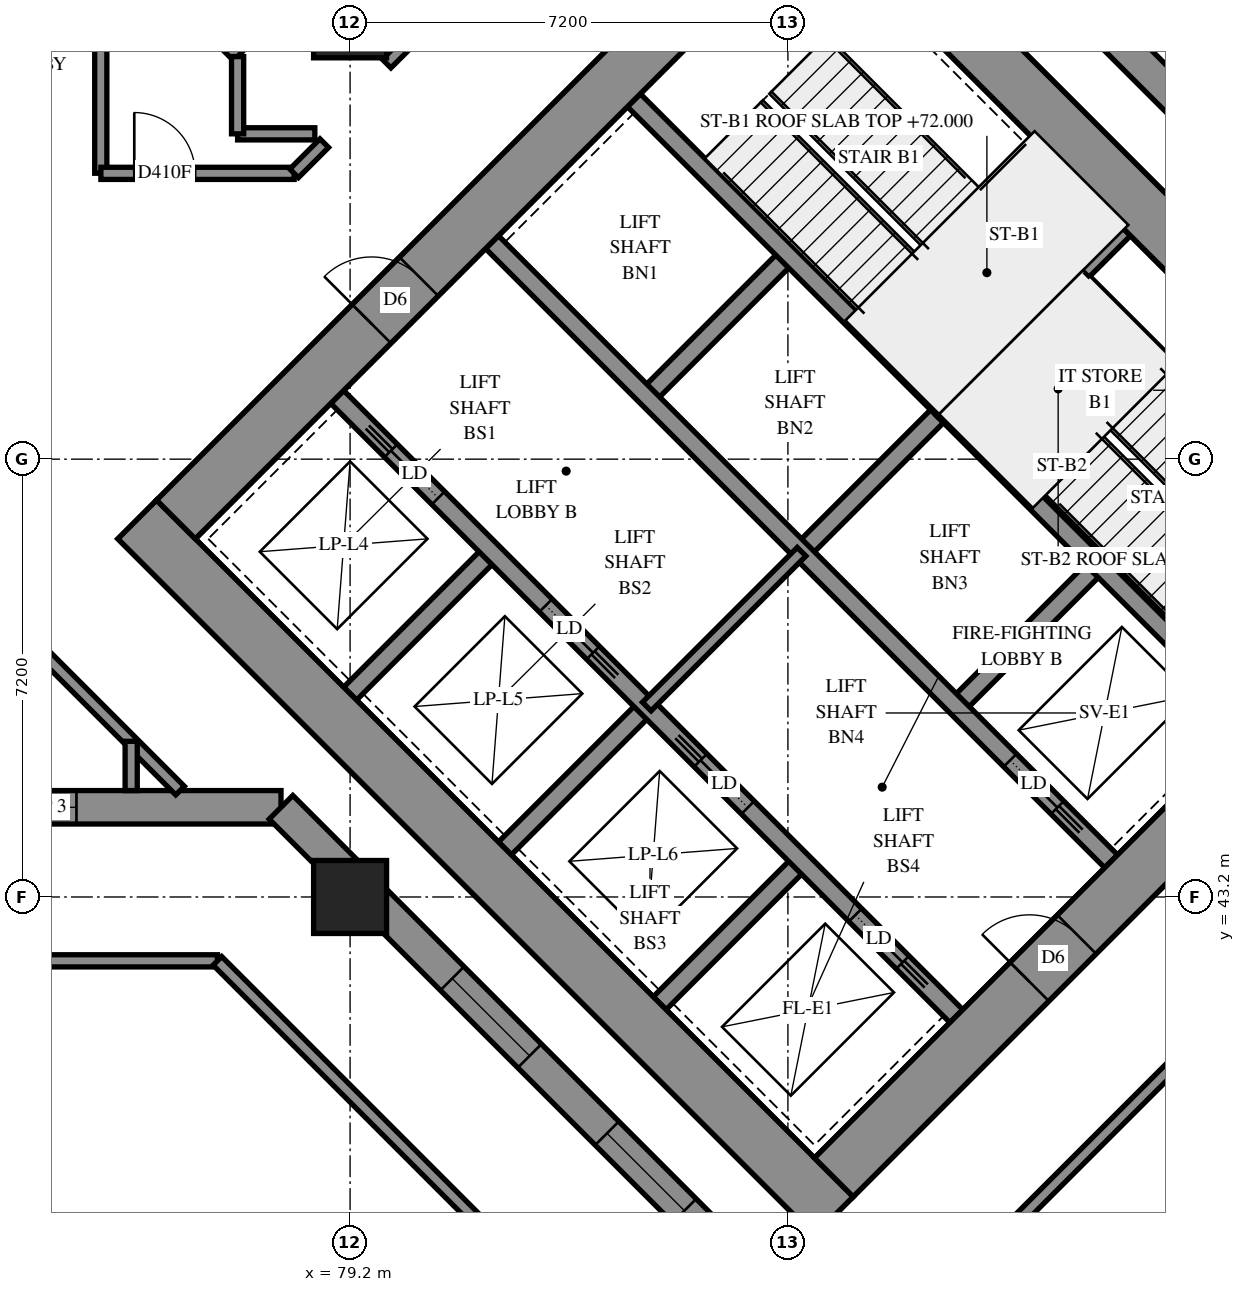
"""IFC4 building model, lengths in metres.
Left out: names, types, materials, properties, quantities, classifications, styles, units other than length and angle.
Written with IfcOpenShell. Run it as: python <this file> out.ifc"""

import sys

from ifc_helpers import new_model, si_unit, direction, frame, frame_2d, origin, origin_2d, place, context, subcontext, project, spatial, polyline, rectangle, outline, extrude, element, fill, save


model = new_model("IFC4")
c1 = context("Model", 3, precision=1e-05, world=origin(), true_north=direction((0.0, 1.0)))
c2 = subcontext(c1, "Body", "Model", "MODEL_VIEW")
j1 = project(units=[si_unit("LENGTHUNIT", "METRE"), si_unit("PLANEANGLEUNIT", "RADIAN")], contexts=[c1])
p1 = place(None, origin())
s1 = spatial("IfcSite", under=j1, at=p1, CompositionType="ELEMENT")
p2 = place(p1, origin())
s2 = spatial("IfcBuilding", under=s1, at=p2, CompositionType="ELEMENT")
p3 = place(p2, frame((0.0, 0.0, 72.0)))
s3 = spatial("IfcBuildingStorey", under=s2, at=p3, CompositionType="ELEMENT", Elevation=72.0)
for number, where, z_axis, x_axis in (
    (1, (79.2, 43.2, 0.0), (0.0, 0.0, 1.0), (1.0, 0.0, 0.0)),
    (2, (79.2, 57.6, 0.0), (0.0, 0.0, 1.0), (1.0, 0.0, 0.0)),
):
    element("IfcColumn", number, at=place(p3, frame(where, z_axis=z_axis, x_axis=x_axis)), inside=s3, PredefinedType="COLUMN", context=c2, shape_type="SweptSolid", body=[
        extrude(rectangle(XDim=1.2, YDim=1.2, at=origin_2d()), origin(), (0.0, 0.0, 1.0), 4.7),
    ])
p4 = place(p3, frame((75.7, 49.408, -0.3), z_axis=(0.0, 0.0, 1.0), x_axis=(0.7071098676, -0.7071036948, 0.0)))
e3 = element("IfcWall", 3, at=p4, inside=s3, PredefinedType="SHEAR", context=c2, shape_type="SweptSolid", body=[
    extrude(rectangle(XDim=16.2, YDim=0.9, at=frame_2d((8.1, 0.0))), origin(), (0.0, 0.0, 1.0), 4.3),
])
p5 = place(p3, frame((86.519, 60.227, -0.3), z_axis=(0.0, 0.0, 1.0), x_axis=(0.7071036948, -0.7071098676, 0.0)))
e4 = element("IfcWall", 4, at=p5, inside=s3, PredefinedType="SHEAR", context=c2, shape_type="SweptSolid", body=[
    extrude(rectangle(XDim=16.2, YDim=0.9, at=frame_2d((8.1, 0.0))), origin(), (0.0, 0.0, 1.0), 4.3),
])
p6 = place(p5, frame((10.9, 0.0, 0.3)))
e5 = element("IfcOpeningElement", 5, at=p6, cuts=e4, PredefinedType="OPENING", context=c2, shape_type="SweptSolid", body=[
    extrude(rectangle(XDim=0.8, YDim=2.1, at=frame_2d((0.4, 1.05))), frame((0.0, 0.46, 0.0), z_axis=(0.0, -1.0, 0.0), x_axis=(1.0, 0.0, 0.0)), (0.0, 0.0, 1.0), 0.92),
])
p7 = place(p3, frame((76.336, 49.408, -0.3), z_axis=(0.0, 0.0, 1.0), x_axis=(0.7071067812, 0.7071067812, 0.0)))
e6 = element("IfcWall", 6, at=p7, inside=s3, PredefinedType="SHEAR", context=c2, shape_type="SweptSolid", body=[
    extrude(rectangle(XDim=14.4, YDim=0.9, at=frame_2d((7.2, 0.0))), origin(), (0.0, 0.0, 1.0), 4.3),
])
p8 = place(p7, frame((4.55, 0.0, 0.3)))
e7 = element("IfcOpeningElement", 7, at=p8, cuts=e6, PredefinedType="OPENING", context=c2, shape_type="SweptSolid", body=[
    extrude(rectangle(XDim=1.1, YDim=2.1, at=frame_2d((0.55, 1.05))), frame((0.0, 0.46, 0.0), z_axis=(0.0, -1.0, 0.0), x_axis=(1.0, 0.0, 0.0)), (0.0, 0.0, 1.0), 0.92),
])
p9 = place(p7, frame((11.35, 0.0, 0.3)))
e8 = element("IfcOpeningElement", 8, at=p9, cuts=e6, PredefinedType="OPENING", context=c2, shape_type="SweptSolid", body=[
    extrude(rectangle(XDim=1.1, YDim=2.1, at=frame_2d((0.55, 1.05))), frame((0.0, 0.46, 0.0), z_axis=(0.0, -1.0, 0.0), x_axis=(1.0, 0.0, 0.0)), (0.0, 0.0, 1.0), 0.92),
])
p10 = place(p3, frame((87.155, 38.589, -0.3), z_axis=(0.0, 0.0, 1.0), x_axis=(0.7071067812, 0.7071067812, 0.0)))
e9 = element("IfcWall", 9, at=p10, inside=s3, PredefinedType="SHEAR", context=c2, shape_type="SweptSolid", body=[
    extrude(rectangle(XDim=14.4, YDim=0.9, at=frame_2d((7.2, 0.0))), origin(), (0.0, 0.0, 1.0), 4.3),
])
p11 = place(p10, frame((4.55, 0.0, 0.3)))
e10 = element("IfcOpeningElement", 10, at=p11, cuts=e9, PredefinedType="OPENING", context=c2, shape_type="SweptSolid", body=[
    extrude(rectangle(XDim=1.1, YDim=2.1, at=frame_2d((0.55, 1.05))), frame((0.0, 0.46, 0.0), z_axis=(0.0, -1.0, 0.0), x_axis=(1.0, 0.0, 0.0)), (0.0, 0.0, 1.0), 0.92),
])
p12 = place(p10, frame((11.35, 0.0, 0.3)))
e11 = element("IfcOpeningElement", 11, at=p12, cuts=e9, PredefinedType="OPENING", context=c2, shape_type="SweptSolid", body=[
    extrude(rectangle(XDim=1.1, YDim=2.1, at=frame_2d((0.55, 1.05))), frame((0.0, 0.46, 0.0), z_axis=(0.0, -1.0, 0.0), x_axis=(1.0, 0.0, 0.0)), (0.0, 0.0, 1.0), 0.92),
])
for number, where, z_axis, x_axis in (
    (12, (79.2, 46.544, 0.0), (0.0, 0.0, 1.0), (0.707, 0.707, 0.0)),
    (13, (84.079, 51.423, 0.0), (0.0, 0.0, 1.0), (0.707, 0.707, 0.0)),
):
    element("IfcWall", number, at=place(p3, frame(where, z_axis=z_axis, x_axis=x_axis)), inside=s3, PredefinedType="SOLIDWALL", context=c2, shape_type="SweptSolid", body=[
        extrude(rectangle(XDim=3.3, YDim=0.3, at=frame_2d((1.65, 0.0))), origin(), (0.0, 0.0, 1.0), 4.7),
    ])
p13 = place(p3, frame((81.746, 43.999, 0.0), z_axis=(0.0, 0.0, 1.0), x_axis=(0.7071067812, 0.7071067812, 0.0)))
e14 = element("IfcWall", 14, at=p13, inside=s3, PredefinedType="SOLIDWALL", context=c2, shape_type="SweptSolid", body=[
    extrude(rectangle(XDim=3.3, YDim=0.3, at=frame_2d((1.65, 0.0))), origin(), (0.0, 0.0, 1.0), 4.7),
])
p14 = place(p3, frame((86.625, 48.878, 0.0), z_axis=(0.0, 0.0, 1.0), x_axis=(0.7071067812, 0.7071067812, 0.0)))
e15 = element("IfcWall", 15, at=p14, inside=s3, PredefinedType="SOLIDWALL", context=c2, shape_type="SweptSolid", body=[
    extrude(rectangle(XDim=3.3, YDim=0.3, at=frame_2d((1.65, 0.0))), origin(), (0.0, 0.0, 1.0), 4.7),
])
p15 = place(p3, frame((84.291, 41.453, 0.0), z_axis=(0.0, 0.0, 1.0), x_axis=(0.7071067812, 0.7071067812, 0.0)))
e16 = element("IfcWall", 16, at=p15, inside=s3, PredefinedType="SOLIDWALL", context=c2, shape_type="SweptSolid", body=[
    extrude(rectangle(XDim=3.3, YDim=0.3, at=frame_2d((1.65, 0.0))), origin(), (0.0, 0.0, 1.0), 4.7),
])
p16 = place(p3, frame((89.17, 46.332, 0.0), z_axis=(0.0, 0.0, 1.0), x_axis=(0.7071067812, 0.7071067812, 0.0)))
e17 = element("IfcWall", 17, at=p16, inside=s3, PredefinedType="SOLIDWALL", context=c2, shape_type="SweptSolid", body=[
    extrude(rectangle(XDim=3.3, YDim=0.3, at=frame_2d((1.65, 0.0))), origin(), (0.0, 0.0, 1.0), 4.7),
])
p17 = place(p3, frame((78.988, 51.423, 0.0), z_axis=(0.0, 0.0, 1.0), x_axis=(0.7071067812, -0.7071067812, 0.0)))
e18 = element("IfcWall", 18, at=p17, inside=s3, PredefinedType="SOLIDWALL", context=c2, shape_type="SweptSolid", body=[
    extrude(rectangle(XDim=14.4, YDim=0.3, at=frame_2d((7.2, 0.0))), origin(), (0.0, 0.0, 1.0), 4.7),
])
p18 = place(p17, frame((1.25, 0.0, 0.0)))
e19 = element("IfcOpeningElement", 19, at=p18, cuts=e18, PredefinedType="OPENING", context=c2, shape_type="SweptSolid", body=[
    extrude(rectangle(XDim=1.1, YDim=2.1, at=frame_2d((0.55, 1.05))), frame((0.0, 0.16, 0.0), z_axis=(0.0, -1.0, 0.0), x_axis=(1.0, 0.0, 0.0)), (0.0, 0.0, 1.0), 0.32),
])
p19 = place(p17, frame((4.85, 0.0, 0.0)))
e20 = element("IfcOpeningElement", 20, at=p19, cuts=e18, PredefinedType="OPENING", context=c2, shape_type="SweptSolid", body=[
    extrude(rectangle(XDim=1.1, YDim=2.1, at=frame_2d((0.55, 1.05))), frame((0.0, 0.16, 0.0), z_axis=(0.0, -1.0, 0.0), x_axis=(1.0, 0.0, 0.0)), (0.0, 0.0, 1.0), 0.32),
])
p20 = place(p17, frame((8.45, 0.0, 0.0)))
e21 = element("IfcOpeningElement", 21, at=p20, cuts=e18, PredefinedType="OPENING", context=c2, shape_type="SweptSolid", body=[
    extrude(rectangle(XDim=1.1, YDim=2.1, at=frame_2d((0.55, 1.05))), frame((0.0, 0.16, 0.0), z_axis=(0.0, -1.0, 0.0), x_axis=(1.0, 0.0, 0.0)), (0.0, 0.0, 1.0), 0.32),
])
p21 = place(p17, frame((12.05, 0.0, 0.0)))
e22 = element("IfcOpeningElement", 22, at=p21, cuts=e18, PredefinedType="OPENING", context=c2, shape_type="SweptSolid", body=[
    extrude(rectangle(XDim=1.1, YDim=2.1, at=frame_2d((0.55, 1.05))), frame((0.0, 0.16, 0.0), z_axis=(0.0, -1.0, 0.0), x_axis=(1.0, 0.0, 0.0)), (0.0, 0.0, 1.0), 0.32),
])
p22 = place(p3, frame((81.534, 53.969, 0.0), z_axis=(0.0, 0.0, 1.0), x_axis=(0.707103309, -0.7071102534, 0.0)))
e23 = element("IfcWall", 23, at=p22, inside=s3, PredefinedType="SOLIDWALL", context=c2, shape_type="SweptSolid", body=[
    extrude(rectangle(XDim=14.4, YDim=0.3, at=frame_2d((7.2, 0.0))), origin(), (0.0, 0.0, 1.0), 4.7),
])
p23 = place(p22, frame((12.05, 0.0, 0.0)))
e24 = element("IfcOpeningElement", 24, at=p23, cuts=e23, PredefinedType="OPENING", context=c2, shape_type="SweptSolid", body=[
    extrude(rectangle(XDim=1.1, YDim=2.1, at=frame_2d((0.55, 1.05))), frame((0.0, 0.16, 0.0), z_axis=(0.0, -1.0, 0.0), x_axis=(1.0, 0.0, 0.0)), (0.0, 0.0, 1.0), 0.32),
])
for number, where, z_axis, x_axis in (
    (25, (83.867, 56.302, 0.0), (0.0, 0.0, 1.0), (0.707, -0.707, 0.0)),
    (26, (88.958, 51.211, 0.0), (0.0, 0.0, 1.0), (0.707, -0.707, 0.0)),
):
    element("IfcWall", number, at=place(p3, frame(where, z_axis=z_axis, x_axis=x_axis)), inside=s3, PredefinedType="SOLIDWALL", context=c2, shape_type="SweptSolid", body=[
        extrude(rectangle(XDim=7.2, YDim=0.3, at=frame_2d((3.6, 0.0))), origin(), (0.0, 0.0, 1.0), 4.7),
    ])
p24 = place(p3, frame((88.958, 51.211, 0.0), z_axis=(0.0, 0.0, 1.0), x_axis=(0.7071067812, 0.7071067812, 0.0)))
e27 = element("IfcWall", 27, at=p24, inside=s3, PredefinedType="SOLIDWALL", context=c2, shape_type="SweptSolid", body=[
    extrude(rectangle(XDim=4.2, YDim=0.3, at=frame_2d((2.1, 0.0))), origin(), (0.0, 0.0, 1.0), 4.7),
])
p25 = place(p3, frame((111.055, 38.059, 0.0), z_axis=(0.0, 0.0, 1.0), x_axis=(-0.7071078702, 0.7071056922, 0.0)))
e28 = element("IfcWall", 28, at=p25, inside=s3, PredefinedType="SOLIDWALL", context=c2, shape_type="SweptSolid", body=[
    extrude(outline(polyline([(-0.275, -0.275), (46.028, -0.275), (45.8, 0.275), (0.275, 0.275), (-0.275, -0.275)])), origin(), (0.0, 0.0, 1.0), 4.7),
])
p26 = place(p3, frame((51.875, 44.675, 0.0), z_axis=(0.0, 0.0, 1.0), x_axis=(1.0, 0.0, 0.0)))
e29 = element("IfcWall", 29, at=p26, inside=s3, PredefinedType="SOLIDWALL", context=c2, shape_type="SweptSolid", body=[
    extrude(outline(polyline([(-0.275, -0.275), (26.075, -0.275), (26.303, 0.275), (0.275, 0.275), (-0.275, -0.275)])), origin(), (0.0, 0.0, 1.0), 4.7),
])
p27 = place(p26, frame((21.025, 0.0, 0.9)))
e30 = element("IfcOpeningElement", 30, at=p27, cuts=e29, PredefinedType="OPENING", context=c2, shape_type="SweptSolid", body=[
    extrude(rectangle(XDim=1.8, YDim=2.4, at=frame_2d((0.9, 1.2))), frame((0.0, 0.285, 0.0), z_axis=(0.0, -1.0, 0.0), x_axis=(1.0, 0.0, 0.0)), (0.0, 0.0, 1.0), 0.57),
])
p28 = place(p3, frame((78.064, 44.675, 0.0), z_axis=(0.0, 0.0, 1.0), x_axis=(0.7071084256, -0.7071051368, 0.0)))
e31 = element("IfcWall", 31, at=p28, inside=s3, PredefinedType="SOLIDWALL", context=c2, shape_type="SweptSolid", body=[
    extrude(outline(polyline([(0.114, -0.275), (30.682, -0.275), (30.132, 0.275), (-0.114, 0.275), (0.114, -0.275)])), origin(), (0.0, 0.0, 1.0), 4.7),
])
p29 = place(p28, frame((3.982, 0.0, 0.9)))
e32 = element("IfcOpeningElement", 32, at=p29, cuts=e31, PredefinedType="OPENING", context=c2, shape_type="SweptSolid", body=[
    extrude(rectangle(XDim=1.8, YDim=2.4, at=frame_2d((0.9, 1.2))), frame((0.0, 0.285, 0.0), z_axis=(0.0, -1.0, 0.0), x_axis=(1.0, 0.0, 0.0)), (0.0, 0.0, 1.0), 0.57),
])
p30 = place(p28, frame((7.582, 0.0, 0.9)))
e33 = element("IfcOpeningElement", 33, at=p30, cuts=e31, PredefinedType="OPENING", context=c2, shape_type="SweptSolid", body=[
    extrude(rectangle(XDim=1.8, YDim=2.4, at=frame_2d((0.9, 1.2))), frame((0.0, 0.285, 0.0), z_axis=(0.0, -1.0, 0.0), x_axis=(1.0, 0.0, 0.0)), (0.0, 0.0, 1.0), 0.57),
])
p31 = place(p3, frame((112.929, 39.756, 0.0), z_axis=(0.0, 0.0, 1.0), x_axis=(-0.7071067812, 0.7071067812, 0.0)))
e34 = element("IfcWall", 34, at=p31, inside=s3, PredefinedType="SOLIDWALL", context=c2, shape_type="SweptSolid", body=[
    extrude(outline(polyline([(-0.1, -0.1), (47.126, -0.1), (47.044, 0.1), (0.1, 0.1), (-0.1, -0.1)])), origin(), (0.0, 0.0, 1.0), 4.7),
])
p32 = place(p3, frame((49.35, 42.15, 0.0), z_axis=(0.0, 0.0, 1.0), x_axis=(1.0, 0.0, 0.0)))
e35 = element("IfcWall", 35, at=p32, inside=s3, PredefinedType="SOLIDWALL", context=c2, shape_type="SweptSolid", body=[
    extrude(outline(polyline([(-0.1, -0.1), (27.627, -0.1), (27.709, 0.1), (0.1, 0.1), (-0.1, -0.1)])), origin(), (0.0, 0.0, 1.0), 4.7),
])
p33 = place(p3, frame((77.018, 42.15, 0.0), z_axis=(0.0, 0.0, 1.0), x_axis=(0.7071067812, -0.7071067812, 0.0)))
e36 = element("IfcWall", 36, at=p33, inside=s3, PredefinedType="SOLIDWALL", context=c2, shape_type="SweptSolid", body=[
    extrude(outline(polyline([(0.041, -0.1), (31.986, -0.1), (31.786, 0.1), (-0.041, 0.1), (0.041, -0.1)])), origin(), (0.0, 0.0, 1.0), 4.7),
])
p34 = place(p3, frame((91.313, 53.354, 0.0), z_axis=(0.0, 0.0, 1.0), x_axis=(0.7071147811, -0.7070987812, 0.0)))
e37 = element("IfcWall", 37, at=p34, inside=s3, PredefinedType="PARTITIONING", context=c2, shape_type="SweptSolid", body=[
    extrude(rectangle(XDim=6.25, YDim=0.15, at=frame_2d((3.125, 0.0))), origin(), (0.0, 0.0, 1.0), 4.7),
])
p35 = place(p3, frame((84.079, 46.332, 0.0), z_axis=(0.0, 0.0, 1.0), x_axis=(0.7071067812, 0.7071067812, 0.0)))
e38 = element("IfcWall", 38, at=p35, inside=s3, PredefinedType="PARTITIONING", context=c2, shape_type="SweptSolid", body=[
    extrude(rectangle(XDim=3.6, YDim=0.2, at=frame_2d((1.8, 0.0))), origin(), (0.0, 0.0, 1.0), 4.7),
])
p36 = place(p3, frame((87.717, 35.411, 0.0), z_axis=(0.0, 0.0, 1.0), x_axis=(0.7072325651, 0.7069809749, 0.0)))
e39 = element("IfcWall", 39, at=p36, inside=s3, PredefinedType="PARTITIONING", context=c2, shape_type="SweptSolid", body=[
    extrude(rectangle(XDim=7.949, YDim=0.2, at=frame_2d((3.975, 0.0))), origin(), (0.0, 0.0, 1.0), 4.7),
])
p37 = place(p3, frame((75.1, 55.102, 0.0), z_axis=(0.0, 0.0, 1.0), x_axis=(0.0, 1.0, 0.0)))
e40 = element("IfcWall", 40, at=p37, inside=s3, PredefinedType="PARTITIONING", context=c2, shape_type="SweptSolid", body=[
    extrude(rectangle(XDim=4.166, YDim=0.2, at=frame_2d((2.083, 0.0))), origin(), (0.0, 0.0, 1.0), 4.7),
])
p38 = place(p3, frame((74.057, 47.297, 0.0), z_axis=(0.0, 0.0, 1.0), x_axis=(0.707121846, -0.707091716, 0.0)))
e41 = element("IfcWall", 41, at=p38, inside=s3, PredefinedType="PARTITIONING", context=c2, shape_type="SweptSolid", body=[
    extrude(rectangle(XDim=3.319, YDim=0.2, at=frame_2d((1.659, 0.0))), origin(), (0.0, 0.0, 1.0), 4.7),
])
p39 = place(p3, frame((75.102, 55.1, 0.0), z_axis=(0.0, 0.0, 1.0), x_axis=(1.0, 0.0, 0.0)))
e42 = element("IfcWall", 42, at=p39, inside=s3, PredefinedType="PARTITIONING", context=c2, shape_type="SweptSolid", body=[
    extrude(rectangle(XDim=3.178, YDim=0.2, at=frame_2d((1.589, 0.0))), origin(), (0.0, 0.0, 1.0), 4.7),
])
p40 = place(p39, frame((0.549, 0.0, 0.0)))
e43 = element("IfcOpeningElement", 43, at=p40, cuts=e42, PredefinedType="OPENING", context=c2, shape_type="SweptSolid", body=[
    extrude(rectangle(XDim=1.0, YDim=2.1, at=frame_2d((0.5, 1.05))), frame((0.0, 0.11, 0.0), z_axis=(0.0, -1.0, 0.0), x_axis=(1.0, 0.0, 0.0)), (0.0, 0.0, 1.0), 0.22),
])
p41 = place(p3, frame((75.879, 58.497, 0.0), z_axis=(0.0, 0.0, 1.0), x_axis=(0.7075866635, -0.706626573, 0.0)))
e44 = element("IfcWall", 44, at=p41, inside=s3, PredefinedType="PARTITIONING", context=c2, shape_type="SweptSolid", body=[
    extrude(rectangle(XDim=2.083, YDim=0.2, at=frame_2d((1.042, 0.0))), origin(), (0.0, 0.0, 1.0), 4.7),
])
p42 = place(p3, frame((79.801, 56.905, 0.0), z_axis=(0.0, 0.0, 1.0), x_axis=(0.7071067812, 0.7071067812, 0.0)))
e45 = element("IfcWall", 45, at=p42, inside=s3, PredefinedType="PARTITIONING", context=c2, shape_type="SweptSolid", body=[
    extrude(rectangle(XDim=1.765, YDim=0.2, at=frame_2d((0.882, 0.0))), origin(), (0.0, 0.0, 1.0), 4.7),
])
for number, where, z_axis, x_axis in (
    (46, (77.35, 55.75, 0.0), (0.0, 0.0, 1.0), (1.0, 0.0, 0.0)),
    (47, (77.35, 55.75, 0.0), (0.0, 0.0, 1.0), (0.0, 1.0, 0.0)),
):
    element("IfcWall", number, at=place(p3, frame(where, z_axis=z_axis, x_axis=x_axis)), inside=s3, PredefinedType="PARTITIONING", context=c2, shape_type="SweptSolid", body=[
        extrude(rectangle(XDim=1.27, YDim=0.2, at=frame_2d((0.635, 0.0))), origin(), (0.0, 0.0, 1.0), 4.7),
    ])
p43 = place(p3, frame((75.6, 44.95, 0.0), z_axis=(0.0, 0.0, 1.0), x_axis=(0.0, 1.0, 0.0)))
e48 = element("IfcWall", 48, at=p43, inside=s3, PredefinedType="PARTITIONING", context=c2, shape_type="SweptSolid", body=[
    extrude(rectangle(XDim=0.81, YDim=0.2, at=frame_2d((0.405, 0.0))), origin(), (0.0, 0.0, 1.0), 4.7),
])
p44 = place(p3, frame((78.279, 55.1, 0.0), z_axis=(0.0, 0.0, 1.0), x_axis=(0.7071067812, 0.7071067812, 0.0)))
e49 = element("IfcWall", 49, at=p44, inside=s3, PredefinedType="PARTITIONING", context=c2, shape_type="SweptSolid", body=[
    extrude(rectangle(XDim=0.701, YDim=0.2, at=frame_2d((0.351, 0.0))), origin(), (0.0, 0.0, 1.0), 4.7),
])
p45 = place(p27, origin())
e50 = element("IfcWindow", 50, at=p45, inside=s3, PartitioningType="SINGLE_PANEL", PredefinedType="WINDOW", context=c2, shape_type="SweptSolid", body=[
    extrude(rectangle(XDim=1.8, YDim=2.4, at=frame_2d((0.9, 1.2))), frame((0.0, 0.155, 0.0), z_axis=(0.0, -1.0, 0.0), x_axis=(1.0, 0.0, 0.0)), (0.0, 0.0, 1.0), 0.06),
])
fill(e30, e50)
p46 = place(p29, origin())
e51 = element("IfcWindow", 51, at=p46, inside=s3, PartitioningType="SINGLE_PANEL", PredefinedType="WINDOW", context=c2, shape_type="SweptSolid", body=[
    extrude(rectangle(XDim=1.8, YDim=2.4, at=frame_2d((0.9, 1.2))), frame((0.0, 0.155, 0.0), z_axis=(0.0, -1.0, 0.0), x_axis=(1.0, 0.0, 0.0)), (0.0, 0.0, 1.0), 0.06),
])
fill(e32, e51)
p47 = place(p30, origin())
e52 = element("IfcWindow", 52, at=p47, inside=s3, PartitioningType="SINGLE_PANEL", PredefinedType="WINDOW", context=c2, shape_type="SweptSolid", body=[
    extrude(rectangle(XDim=1.8, YDim=2.4, at=frame_2d((0.9, 1.2))), frame((0.0, 0.155, 0.0), z_axis=(0.0, -1.0, 0.0), x_axis=(1.0, 0.0, 0.0)), (0.0, 0.0, 1.0), 0.06),
])
fill(e33, e52)
p48 = place(p8, origin())
e53 = element("IfcDoor", 53, at=p48, inside=s3, OperationType="DOUBLE_DOOR_SINGLE_SWING", PredefinedType="DOOR", context=c2, shape_type="SweptSolid", body=[
    extrude(rectangle(XDim=1.1, YDim=2.1, at=frame_2d((0.55, 1.05))), frame((0.0, 0.025, 0.0), z_axis=(0.0, -1.0, 0.0), x_axis=(1.0, 0.0, 0.0)), (0.0, 0.0, 1.0), 0.05),
])
fill(e7, e53)
p49 = place(p11, origin())
e54 = element("IfcDoor", 54, at=p49, inside=s3, OperationType="DOUBLE_DOOR_SINGLE_SWING", PredefinedType="DOOR", context=c2, shape_type="SweptSolid", body=[
    extrude(rectangle(XDim=1.1, YDim=2.1, at=frame_2d((0.55, 1.05))), frame((0.0, 0.025, 0.0), z_axis=(0.0, -1.0, 0.0), x_axis=(1.0, 0.0, 0.0)), (0.0, 0.0, 1.0), 0.05),
])
fill(e10, e54)
p50 = place(p18, origin())
e55 = element("IfcDoor", 55, at=p50, inside=s3, OperationType="SLIDING_TO_LEFT", PredefinedType="DOOR", context=c2, shape_type="SweptSolid", body=[
    extrude(rectangle(XDim=1.1, YDim=2.1, at=frame_2d((0.55, 1.05))), frame((0.0, 0.025, 0.0), z_axis=(0.0, -1.0, 0.0), x_axis=(1.0, 0.0, 0.0)), (0.0, 0.0, 1.0), 0.05),
])
fill(e19, e55)
p51 = place(p19, origin())
e56 = element("IfcDoor", 56, at=p51, inside=s3, OperationType="SLIDING_TO_RIGHT", PredefinedType="DOOR", context=c2, shape_type="SweptSolid", body=[
    extrude(rectangle(XDim=1.1, YDim=2.1, at=frame_2d((0.55, 1.05))), frame((0.0, 0.025, 0.0), z_axis=(0.0, -1.0, 0.0), x_axis=(1.0, 0.0, 0.0)), (0.0, 0.0, 1.0), 0.05),
])
fill(e20, e56)
p52 = place(p20, origin())
e57 = element("IfcDoor", 57, at=p52, inside=s3, OperationType="SLIDING_TO_LEFT", PredefinedType="DOOR", context=c2, shape_type="SweptSolid", body=[
    extrude(rectangle(XDim=1.1, YDim=2.1, at=frame_2d((0.55, 1.05))), frame((0.0, 0.025, 0.0), z_axis=(0.0, -1.0, 0.0), x_axis=(1.0, 0.0, 0.0)), (0.0, 0.0, 1.0), 0.05),
])
fill(e21, e57)
p53 = place(p21, origin())
e58 = element("IfcDoor", 58, at=p53, inside=s3, OperationType="SLIDING_TO_RIGHT", PredefinedType="DOOR", context=c2, shape_type="SweptSolid", body=[
    extrude(rectangle(XDim=1.1, YDim=2.1, at=frame_2d((0.55, 1.05))), frame((0.0, 0.025, 0.0), z_axis=(0.0, -1.0, 0.0), x_axis=(1.0, 0.0, 0.0)), (0.0, 0.0, 1.0), 0.05),
])
fill(e22, e58)
p54 = place(p23, origin())
e59 = element("IfcDoor", 59, at=p54, inside=s3, OperationType="SLIDING_TO_RIGHT", PredefinedType="DOOR", context=c2, shape_type="SweptSolid", body=[
    extrude(rectangle(XDim=1.1, YDim=2.1, at=frame_2d((0.55, 1.05))), frame((0.0, 0.025, 0.0), z_axis=(0.0, -1.0, 0.0), x_axis=(1.0, 0.0, 0.0)), (0.0, 0.0, 1.0), 0.05),
])
fill(e24, e59)
p55 = place(p40, origin())
e60 = element("IfcDoor", 60, at=p55, inside=s3, OperationType="SINGLE_SWING_LEFT", PredefinedType="DOOR", context=c2, shape_type="SweptSolid", body=[
    extrude(rectangle(XDim=1.0, YDim=2.1, at=frame_2d((0.5, 1.05))), frame((0.0, 0.025, 0.0), z_axis=(0.0, -1.0, 0.0), x_axis=(1.0, 0.0, 0.0)), (0.0, 0.0, 1.0), 0.05),
])
fill(e43, e60)
save(model, sys.argv[1])
